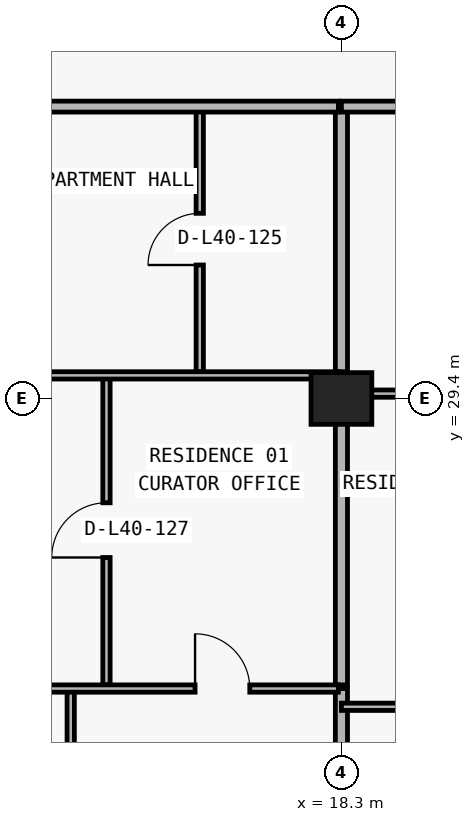
"""IFC4 building model, lengths in metres.
Left out: names, types, materials, properties, quantities, classifications, styles, units other than length and angle.
Written with IfcOpenShell. Run it as: python <this file> out.ifc"""

import sys

from ifc_helpers import new_model, si_unit, direction, frame, frame_2d, origin, origin_2d, place, context, subcontext, project, spatial, rectangle, extrude, element, fill, save


model = new_model("IFC4")
c1 = context("Model", 3, precision=1e-05, world=origin(), true_north=direction((0.0, 1.0)))
c2 = subcontext(c1, "Body", "Model", "MODEL_VIEW")
j1 = project(units=[si_unit("LENGTHUNIT", "METRE"), si_unit("PLANEANGLEUNIT", "RADIAN")], contexts=[c1])
p1 = place(None, origin())
s1 = spatial("IfcSite", under=j1, at=p1, CompositionType="ELEMENT")
p2 = place(p1, origin())
s2 = spatial("IfcBuilding", under=s1, at=p2, CompositionType="ELEMENT")
p3 = place(p2, frame((0.0, 0.0, 145.5)))
s3 = spatial("IfcBuildingStorey", under=s2, at=p3, CompositionType="ELEMENT", Elevation=145.5)
p4 = place(p3, frame((18.3, 29.4, 0.0), z_axis=(0.0, 0.0, 1.0), x_axis=(1.0, 0.0, 0.0)))
e1 = element("IfcColumn", 1, at=p4, inside=s3, PredefinedType="COLUMN", context=c2, shape_type="SweptSolid", body=[
    extrude(rectangle(XDim=1.0, YDim=0.85, at=origin_2d()), origin(), (0.0, 0.0, 1.0), 3.05),
])
p5 = place(p3, frame((13.848, 8.84, 0.0), z_axis=(0.0, 0.0, 1.0), x_axis=(0.0, 1.0, 0.0)))
e2 = element("IfcWall", 2, at=p5, inside=s3, PredefinedType="PARTITIONING", context=c2, shape_type="SweptSolid", body=[
    extrude(rectangle(XDim=15.79, YDim=0.12, at=frame_2d((7.895, 0.0))), origin(), (0.0, 0.0, 1.0), 3.05),
])
p6 = place(p3, frame((14.436, 24.69, 0.0), z_axis=(0.0, 0.0, 1.0), x_axis=(0.0, 1.0, 0.0)))
e3 = element("IfcWall", 3, at=p6, inside=s3, PredefinedType="PARTITIONING", context=c2, shape_type="SweptSolid", body=[
    extrude(rectangle(XDim=5.09, YDim=0.12, at=frame_2d((2.545, 0.0))), origin(), (0.0, 0.0, 1.0), 3.05),
])
p7 = place(p6, frame((2.095, 0.0, 0.0)))
e4 = element("IfcOpeningElement", 4, at=p7, cuts=e3, PredefinedType="OPENING", context=c2, shape_type="SweptSolid", body=[
    extrude(rectangle(XDim=0.9, YDim=2.15, at=frame_2d((0.45, 1.075))), frame((0.0, 0.07, 0.0), z_axis=(0.0, -1.0, 0.0), x_axis=(1.0, 0.0, 0.0)), (0.0, 0.0, 1.0), 0.14),
])
p8 = place(p3, frame((15.97, 29.84, 0.0), z_axis=(0.0, 0.0, 1.0), x_axis=(0.0, 1.0, 0.0)))
e5 = element("IfcWall", 5, at=p8, inside=s3, PredefinedType="PARTITIONING", context=c2, shape_type="SweptSolid", body=[
    extrude(rectangle(XDim=4.36, YDim=0.12, at=frame_2d((2.18, 0.0))), origin(), (0.0, 0.0, 1.0), 3.05),
])
p9 = place(p8, frame((1.755, 0.0, 0.0)))
e6 = element("IfcOpeningElement", 6, at=p9, cuts=e5, PredefinedType="OPENING", context=c2, shape_type="SweptSolid", body=[
    extrude(rectangle(XDim=0.85, YDim=2.1, at=frame_2d((0.425, 1.05))), frame((0.0, 0.07, 0.0), z_axis=(0.0, -1.0, 0.0), x_axis=(1.0, 0.0, 0.0)), (0.0, 0.0, 1.0), 0.14),
])
p10 = place(p3, frame((18.3, 8.84, 0.0), z_axis=(0.0, 0.0, 1.0), x_axis=(0.0, 1.0, 0.0)))
e7 = element("IfcWall", 7, at=p10, inside=s3, PredefinedType="PARTITIONING", context=c2, shape_type="SweptSolid", body=[
    extrude(rectangle(XDim=15.79, YDim=0.2, at=frame_2d((7.895, 0.0))), origin(), (0.0, 0.0, 1.0), 2.174),
])
p11 = place(p3, frame((18.3, 24.69, 0.0), z_axis=(0.0, 0.0, 1.0), x_axis=(0.0, 1.0, 0.0)))
e8 = element("IfcWall", 8, at=p11, inside=s3, PredefinedType="PARTITIONING", context=c2, shape_type="SweptSolid", body=[
    extrude(rectangle(XDim=5.09, YDim=0.2, at=frame_2d((2.545, 0.0))), origin(), (0.0, 0.0, 1.0), 2.174),
])
p12 = place(p3, frame((18.3, 29.84, 0.0), z_axis=(0.0, 0.0, 1.0), x_axis=(0.0, 1.0, 0.0)))
e9 = element("IfcWall", 9, at=p12, inside=s3, PredefinedType="PARTITIONING", context=c2, shape_type="SweptSolid", body=[
    extrude(rectangle(XDim=4.36, YDim=0.2, at=frame_2d((2.18, 0.0))), origin(), (0.0, 0.0, 1.0), 2.174),
])
p13 = place(p3, frame((18.3, 24.33, 0.0), z_axis=(0.0, 0.0, 1.0), x_axis=(1.0, 0.0, 0.0)))
e10 = element("IfcWall", 10, at=p13, inside=s3, PredefinedType="PARTITIONING", context=c2, shape_type="SweptSolid", body=[
    extrude(rectangle(XDim=8.18, YDim=0.12, at=frame_2d((4.09, 0.0))), origin(), (0.0, 0.0, 1.0), 3.05),
])
p14 = place(p13, frame((1.86, 0.0, 0.0)))
e11 = element("IfcOpeningElement", 11, at=p14, cuts=e10, PredefinedType="OPENING", context=c2, shape_type="SweptSolid", body=[
    extrude(rectangle(XDim=0.9, YDim=2.15, at=frame_2d((0.45, 1.075))), frame((0.0, 0.07, 0.0), z_axis=(0.0, -1.0, 0.0), x_axis=(1.0, 0.0, 0.0)), (0.0, 0.0, 1.0), 0.14),
])
p15 = place(p13, frame((6.033, 0.0, 0.0)))
e12 = element("IfcOpeningElement", 12, at=p15, cuts=e10, PredefinedType="OPENING", context=c2, shape_type="SweptSolid", body=[
    extrude(rectangle(XDim=0.9, YDim=2.15, at=frame_2d((0.45, 1.075))), frame((0.0, 0.07, 0.0), z_axis=(0.0, -1.0, 0.0), x_axis=(1.0, 0.0, 0.0)), (0.0, 0.0, 1.0), 0.14),
])
p16 = place(p3, frame((9.9, 24.63, 0.0), z_axis=(0.0, 0.0, 1.0), x_axis=(1.0, 0.0, 0.0)))
e13 = element("IfcWall", 13, at=p16, inside=s3, PredefinedType="PARTITIONING", context=c2, shape_type="SweptSolid", body=[
    extrude(rectangle(XDim=8.35, YDim=0.12, at=frame_2d((4.175, 0.0))), origin(), (0.0, 0.0, 1.0), 3.05),
])
p17 = place(p16, frame((1.524, 0.0, 0.0)))
e14 = element("IfcOpeningElement", 14, at=p17, cuts=e13, PredefinedType="OPENING", context=c2, shape_type="SweptSolid", body=[
    extrude(rectangle(XDim=0.9, YDim=2.15, at=frame_2d((0.45, 1.075))), frame((0.0, 0.07, 0.0), z_axis=(0.0, -1.0, 0.0), x_axis=(1.0, 0.0, 0.0)), (0.0, 0.0, 1.0), 0.14),
])
p18 = place(p16, frame((5.993, 0.0, 0.0)))
e15 = element("IfcOpeningElement", 15, at=p18, cuts=e13, PredefinedType="OPENING", context=c2, shape_type="SweptSolid", body=[
    extrude(rectangle(XDim=0.9, YDim=2.15, at=frame_2d((0.45, 1.075))), frame((0.0, 0.07, 0.0), z_axis=(0.0, -1.0, 0.0), x_axis=(1.0, 0.0, 0.0)), (0.0, 0.0, 1.0), 0.14),
])
p19 = place(p3, frame((18.3, 29.48, 0.0), z_axis=(0.0, 0.0, 1.0), x_axis=(1.0, 0.0, 0.0)))
e16 = element("IfcWall", 16, at=p19, inside=s3, PredefinedType="PARTITIONING", context=c2, shape_type="SweptSolid", body=[
    extrude(rectangle(XDim=8.18, YDim=0.12, at=frame_2d((4.09, 0.0))), origin(), (0.0, 0.0, 1.0), 2.174),
])
p20 = place(p19, frame((1.943, 0.0, 0.0)))
e17 = element("IfcOpeningElement", 17, at=p20, cuts=e16, PredefinedType="OPENING", context=c2, shape_type="SweptSolid", body=[
    extrude(rectangle(XDim=0.9, YDim=2.124, at=frame_2d((0.45, 1.062))), frame((0.0, 0.07, 0.0), z_axis=(0.0, -1.0, 0.0), x_axis=(1.0, 0.0, 0.0)), (0.0, 0.0, 1.0), 0.14),
])
p21 = place(p3, frame((9.9, 29.78, 0.0), z_axis=(0.0, 0.0, 1.0), x_axis=(1.0, 0.0, 0.0)))
e18 = element("IfcWall", 18, at=p21, inside=s3, PredefinedType="PARTITIONING", context=c2, shape_type="SweptSolid", body=[
    extrude(rectangle(XDim=8.35, YDim=0.12, at=frame_2d((4.175, 0.0))), origin(), (0.0, 0.0, 1.0), 3.05),
])
p22 = place(p21, frame((1.818, 0.0, 0.0)))
e19 = element("IfcOpeningElement", 19, at=p22, cuts=e18, PredefinedType="OPENING", context=c2, shape_type="SweptSolid", body=[
    extrude(rectangle(XDim=0.9, YDim=2.15, at=frame_2d((0.45, 1.075))), frame((0.0, 0.07, 0.0), z_axis=(0.0, -1.0, 0.0), x_axis=(1.0, 0.0, 0.0)), (0.0, 0.0, 1.0), 0.14),
])
p23 = place(p3, frame((7.705, 34.2, 0.0), z_axis=(0.0, 0.0, 1.0), x_axis=(1.0, 0.0, 0.0)))
e20 = element("IfcWall", 20, at=p23, inside=s3, PredefinedType="PARTITIONING", context=c2, shape_type="SweptSolid", body=[
    extrude(rectangle(XDim=10.545, YDim=0.18, at=frame_2d((5.272, 0.0))), origin(), (0.0, 0.0, 1.0), 3.05),
])
p24 = place(p23, frame((4.73, 0.0, 0.0)))
e21 = element("IfcOpeningElement", 21, at=p24, cuts=e20, PredefinedType="OPENING", context=c2, shape_type="SweptSolid", body=[
    extrude(rectangle(XDim=1.0, YDim=2.2, at=frame_2d((0.5, 1.1))), frame((0.0, 0.1, 0.0), z_axis=(0.0, -1.0, 0.0), x_axis=(1.0, 0.0, 0.0)), (0.0, 0.0, 1.0), 0.2),
])
p25 = place(p3, frame((18.3, 34.2, 0.0), z_axis=(0.0, 0.0, 1.0), x_axis=(1.0, 0.0, 0.0)))
e22 = element("IfcWall", 22, at=p25, inside=s3, PredefinedType="PARTITIONING", context=c2, shape_type="SweptSolid", body=[
    extrude(rectangle(XDim=8.35, YDim=0.18, at=frame_2d((4.175, 0.0))), origin(), (0.0, 0.0, 1.0), 3.05),
])
p26 = place(p25, frame((2.683, 0.0, 0.0)))
e23 = element("IfcOpeningElement", 23, at=p26, cuts=e22, PredefinedType="OPENING", context=c2, shape_type="SweptSolid", body=[
    extrude(rectangle(XDim=1.0, YDim=2.2, at=frame_2d((0.5, 1.1))), frame((0.0, 0.1, 0.0), z_axis=(0.0, -1.0, 0.0), x_axis=(1.0, 0.0, 0.0)), (0.0, 0.0, 1.0), 0.2),
])
p27 = place(p9, origin())
e24 = element("IfcDoor", 24, at=p27, inside=s3, OperationType="SINGLE_SWING_LEFT", PredefinedType="DOOR", context=c2, shape_type="SweptSolid", body=[
    extrude(rectangle(XDim=0.85, YDim=2.1, at=frame_2d((0.425, 1.05))), frame((0.0, 0.025, 0.0), z_axis=(0.0, -1.0, 0.0), x_axis=(1.0, 0.0, 0.0)), (0.0, 0.0, 1.0), 0.05),
])
fill(e6, e24)
p28 = place(p7, origin())
e25 = element("IfcDoor", 25, at=p28, inside=s3, OperationType="SINGLE_SWING_LEFT", PredefinedType="DOOR", context=c2, shape_type="SweptSolid", body=[
    extrude(rectangle(XDim=0.9, YDim=2.15, at=frame_2d((0.45, 1.075))), frame((0.0, 0.025, 0.0), z_axis=(0.0, -1.0, 0.0), x_axis=(1.0, 0.0, 0.0)), (0.0, 0.0, 1.0), 0.05),
])
fill(e4, e25)
p29 = place(p18, origin())
e26 = element("IfcDoor", 26, at=p29, inside=s3, OperationType="SINGLE_SWING_LEFT", PredefinedType="DOOR", context=c2, shape_type="SweptSolid", body=[
    extrude(rectangle(XDim=0.9, YDim=2.15, at=frame_2d((0.45, 1.075))), frame((0.0, 0.025, 0.0), z_axis=(0.0, -1.0, 0.0), x_axis=(1.0, 0.0, 0.0)), (0.0, 0.0, 1.0), 0.05),
])
fill(e15, e26)
save(model, sys.argv[1])
